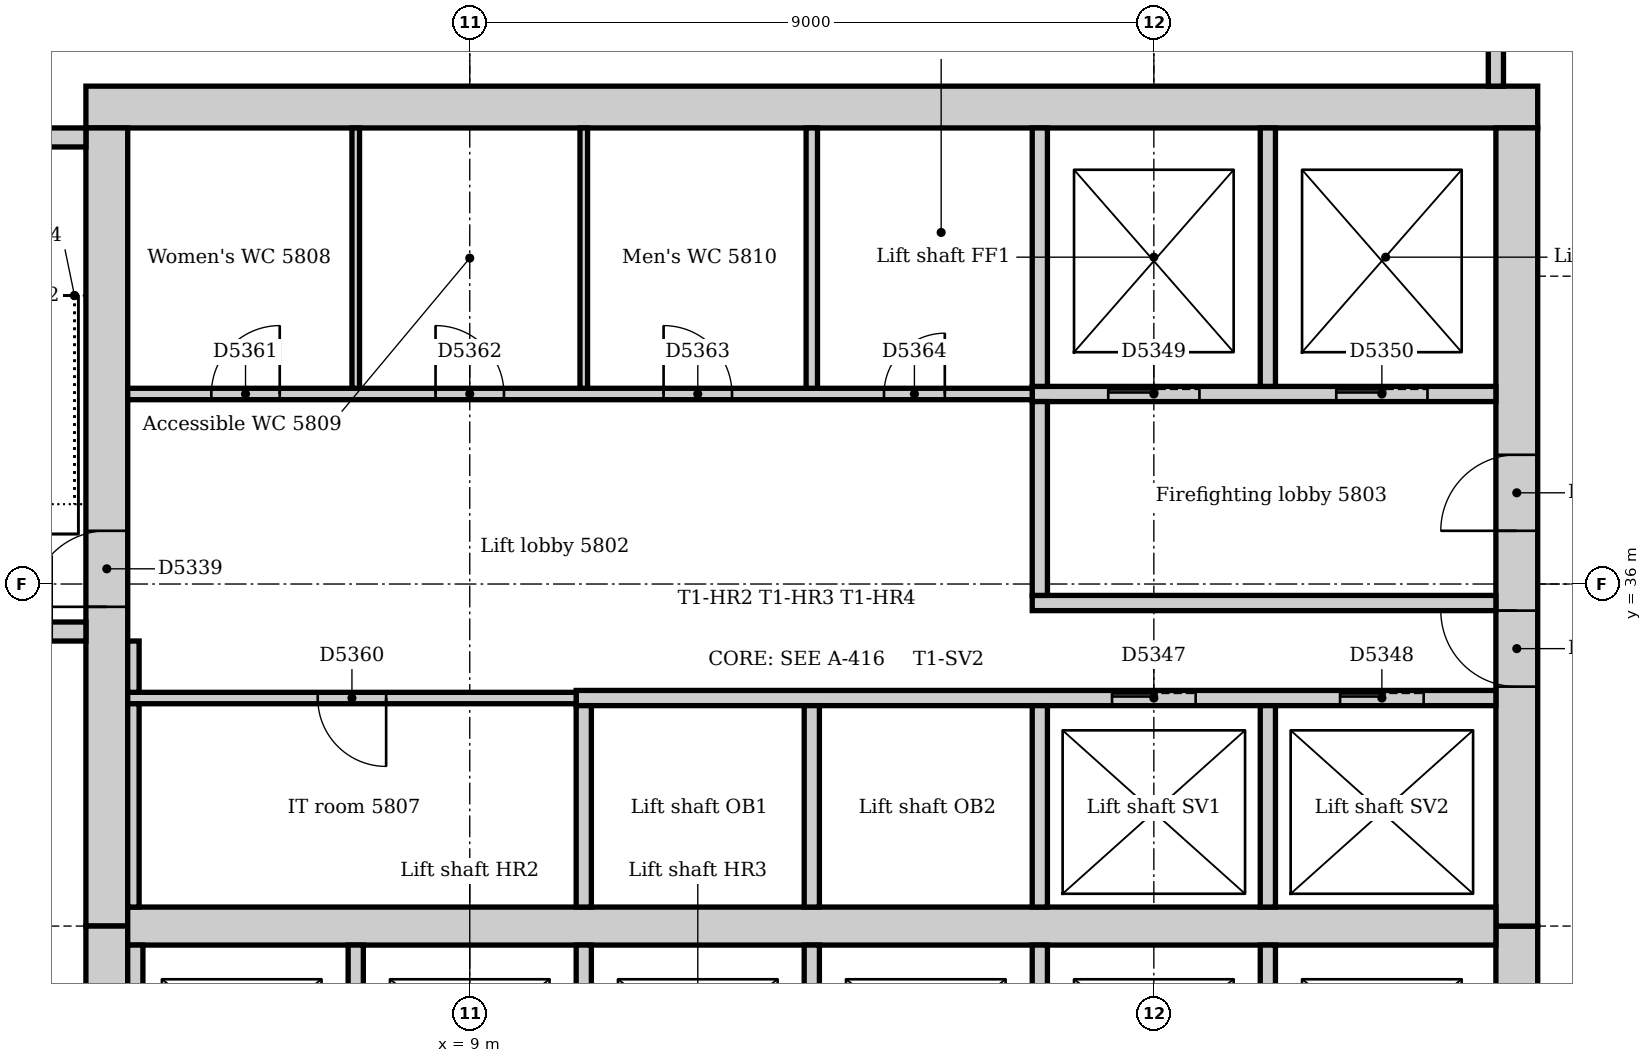
"""IFC4 building model, lengths in metres.
Left out: names, types, materials, properties, quantities, classifications, styles, units other than length and angle.
Written with IfcOpenShell. Run it as: python <this file> out.ifc"""

import sys

from ifc_helpers import new_model, si_unit, direction, frame, frame_2d, origin, place, context, subcontext, project, spatial, rectangle, extrude, element, fill, save


model = new_model("IFC4")
c1 = context("Model", 3, precision=1e-05, world=origin(), true_north=direction((0.0, 1.0)))
c2 = subcontext(c1, "Body", "Model", "MODEL_VIEW")
j1 = project(units=[si_unit("LENGTHUNIT", "METRE"), si_unit("PLANEANGLEUNIT", "RADIAN")], contexts=[c1])
p1 = place(None, origin())
s1 = spatial("IfcSite", under=j1, at=p1, CompositionType="ELEMENT")
p2 = place(p1, origin())
s2 = spatial("IfcBuilding", under=s1, at=p2, CompositionType="ELEMENT")
p3 = place(p2, frame((0.0, 0.0, 242.0)))
s3 = spatial("IfcBuildingStorey", under=s2, at=p3, CompositionType="ELEMENT", Elevation=242.0)
p4 = place(p3, frame((23.05, 42.275, 0.0), z_axis=(0.0, 0.0, 1.0), x_axis=(-1.0, 0.0, 0.0)))
e1 = element("IfcWall", 1, at=p4, inside=s3, PredefinedType="SOLIDWALL", context=c2, shape_type="SweptSolid", body=[
    extrude(rectangle(XDim=19.1, YDim=0.55, at=frame_2d((9.55, 0.0))), origin(), (0.0, 0.0, 1.0), 5.0),
])
p5 = place(p3, frame((22.775, 21.0, 0.0), z_axis=(0.0, 0.0, 1.0), x_axis=(0.0, 1.0, 0.0)))
e2 = element("IfcWall", 2, at=p5, inside=s3, PredefinedType="SOLIDWALL", context=c2, shape_type="SweptSolid", body=[
    extrude(rectangle(XDim=10.5, YDim=0.55, at=frame_2d((5.25, 0.0))), origin(), (0.0, 0.0, 1.0), 5.0),
])
p6 = place(p5, frame((4.35, 0.0, 0.0)))
e3 = element("IfcOpeningElement", 3, at=p6, cuts=e2, PredefinedType="OPENING", context=c2, shape_type="SweptSolid", body=[
    extrude(rectangle(XDim=1.8, YDim=2.1, at=frame_2d((0.9, 1.05))), frame((0.0, 0.285, 0.0), z_axis=(0.0, -1.0, 0.0), x_axis=(1.0, 0.0, 0.0)), (0.0, 0.0, 1.0), 0.57),
])
p7 = place(p3, frame((22.775, 31.5, 0.0), z_axis=(0.0, 0.0, 1.0), x_axis=(0.0, 1.0, 0.0)))
e4 = element("IfcWall", 4, at=p7, inside=s3, PredefinedType="SOLIDWALL", context=c2, shape_type="SweptSolid", body=[
    extrude(rectangle(XDim=10.5, YDim=0.55, at=frame_2d((5.25, 0.0))), origin(), (0.0, 0.0, 1.0), 5.0),
])
p8 = place(p7, frame((3.15, 0.0, 0.0)))
e5 = element("IfcOpeningElement", 5, at=p8, cuts=e4, PredefinedType="OPENING", context=c2, shape_type="SweptSolid", body=[
    extrude(rectangle(XDim=1.0, YDim=2.1, at=frame_2d((0.5, 1.05))), frame((0.0, 0.285, 0.0), z_axis=(0.0, -1.0, 0.0), x_axis=(1.0, 0.0, 0.0)), (0.0, 0.0, 1.0), 0.57),
])
p9 = place(p7, frame((5.2, 0.0, 0.0)))
e6 = element("IfcOpeningElement", 6, at=p9, cuts=e4, PredefinedType="OPENING", context=c2, shape_type="SweptSolid", body=[
    extrude(rectangle(XDim=1.0, YDim=2.1, at=frame_2d((0.5, 1.05))), frame((0.0, 0.285, 0.0), z_axis=(0.0, -1.0, 0.0), x_axis=(1.0, 0.0, 0.0)), (0.0, 0.0, 1.0), 0.57),
])
p10 = place(p3, frame((4.225, 42.0, 0.0), z_axis=(0.0, 0.0, 1.0), x_axis=(0.0, -1.0, 0.0)))
e7 = element("IfcWall", 7, at=p10, inside=s3, PredefinedType="SOLIDWALL", context=c2, shape_type="SweptSolid", body=[
    extrude(rectangle(XDim=10.5, YDim=0.55, at=frame_2d((5.25, 0.0))), origin(), (0.0, 0.0, 1.0), 5.0),
])
p11 = place(p10, frame((5.3, 0.0, 0.0)))
e8 = element("IfcOpeningElement", 8, at=p11, cuts=e7, PredefinedType="OPENING", context=c2, shape_type="SweptSolid", body=[
    extrude(rectangle(XDim=1.0, YDim=2.1, at=frame_2d((0.5, 1.05))), frame((0.0, 0.285, 0.0), z_axis=(0.0, -1.0, 0.0), x_axis=(1.0, 0.0, 0.0)), (0.0, 0.0, 1.0), 0.57),
])
p12 = place(p3, frame((4.225, 31.5, 0.0), z_axis=(0.0, 0.0, 1.0), x_axis=(0.0, -1.0, 0.0)))
e9 = element("IfcWall", 9, at=p12, inside=s3, PredefinedType="SOLIDWALL", context=c2, shape_type="SweptSolid", body=[
    extrude(rectangle(XDim=10.5, YDim=0.55, at=frame_2d((5.25, 0.0))), origin(), (0.0, 0.0, 1.0), 5.0),
])
p13 = place(p12, frame((4.25, 0.0, 0.0)))
e10 = element("IfcOpeningElement", 10, at=p13, cuts=e9, PredefinedType="OPENING", context=c2, shape_type="SweptSolid", body=[
    extrude(rectangle(XDim=1.0, YDim=2.1, at=frame_2d((0.5, 1.05))), frame((0.0, 0.285, 0.0), z_axis=(0.0, -1.0, 0.0), x_axis=(1.0, 0.0, 0.0)), (0.0, 0.0, 1.0), 0.57),
])
p14 = place(p3, frame((4.5, 31.5, 0.0), z_axis=(0.0, 0.0, 1.0), x_axis=(1.0, 0.0, 0.0)))
e11 = element("IfcWall", 11, at=p14, inside=s3, PredefinedType="SOLIDWALL", context=c2, shape_type="SweptSolid", body=[
    extrude(rectangle(XDim=18.0, YDim=0.5, at=frame_2d((9.0, 0.0))), origin(), (0.0, 0.0, 1.0), 5.0),
])
p15 = place(p3, frame((0.36, 35.375, 0.0), z_axis=(0.0, 0.0, 1.0), x_axis=(1.0, 0.0, 0.0)))
e12 = element("IfcWall", 12, at=p15, inside=s3, PredefinedType="SOLIDWALL", context=c2, shape_type="SweptSolid", body=[
    extrude(rectangle(XDim=3.59, YDim=0.25, at=frame_2d((1.795, 0.0))), origin(), (0.0, 0.0, 1.0), 5.0),
])
p16 = place(p15, frame((2.14, 0.0, 0.0)))
e13 = element("IfcOpeningElement", 13, at=p16, cuts=e12, PredefinedType="OPENING", context=c2, shape_type="SweptSolid", body=[
    extrude(rectangle(XDim=1.0, YDim=2.1, at=frame_2d((0.5, 1.05))), frame((0.0, 0.135, 0.0), z_axis=(0.0, -1.0, 0.0), x_axis=(1.0, 0.0, 0.0)), (0.0, 0.0, 1.0), 0.27),
])
p17 = place(p3, frame((3.95, 41.875, 0.0), z_axis=(0.0, 0.0, 1.0), x_axis=(-1.0, 0.0, 0.0)))
e14 = element("IfcWall", 14, at=p17, inside=s3, PredefinedType="SOLIDWALL", context=c2, shape_type="SweptSolid", body=[
    extrude(rectangle(XDim=3.59, YDim=0.25, at=frame_2d((1.795, 0.0))), origin(), (0.0, 0.0, 1.0), 5.0),
])
p18 = place(p3, frame((16.4, 35.75, 0.0), z_axis=(0.0, 0.0, 1.0), x_axis=(1.0, 0.0, 0.0)))
e15 = element("IfcWall", 15, at=p18, inside=s3, PredefinedType="PARTITIONING", context=c2, shape_type="SweptSolid", body=[
    extrude(rectangle(XDim=6.1, YDim=0.2, at=frame_2d((3.05, 0.0))), origin(), (0.0, 0.0, 1.0), 4.85),
])
p19 = place(p3, frame((16.4, 38.5, 0.0), z_axis=(0.0, 0.0, 1.0), x_axis=(1.0, 0.0, 0.0)))
e16 = element("IfcWall", 16, at=p19, inside=s3, PredefinedType="PARTITIONING", context=c2, shape_type="SweptSolid", body=[
    extrude(rectangle(XDim=6.1, YDim=0.2, at=frame_2d((3.05, 0.0))), origin(), (0.0, 0.0, 1.0), 4.85),
])
p20 = place(p19, frame((1.0, 0.0, 0.0)))
e17 = element("IfcOpeningElement", 17, at=p20, cuts=e16, PredefinedType="OPENING", context=c2, shape_type="SweptSolid", body=[
    extrude(rectangle(XDim=1.2, YDim=2.1, at=frame_2d((0.6, 1.05))), frame((0.0, 0.11, 0.0), z_axis=(0.0, -1.0, 0.0), x_axis=(1.0, 0.0, 0.0)), (0.0, 0.0, 1.0), 0.22),
])
p21 = place(p19, frame((4.0, 0.0, 0.0)))
e18 = element("IfcOpeningElement", 18, at=p21, cuts=e16, PredefinedType="OPENING", context=c2, shape_type="SweptSolid", body=[
    extrude(rectangle(XDim=1.2, YDim=2.1, at=frame_2d((0.6, 1.05))), frame((0.0, 0.11, 0.0), z_axis=(0.0, -1.0, 0.0), x_axis=(1.0, 0.0, 0.0)), (0.0, 0.0, 1.0), 0.22),
])
p22 = place(p3, frame((22.5, 42.55, 0.0), z_axis=(0.0, 0.0, 1.0), x_axis=(0.0, 1.0, 0.0)))
e19 = element("IfcWall", 19, at=p22, inside=s3, PredefinedType="PARTITIONING", context=c2, shape_type="SweptSolid", body=[
    extrude(rectangle(XDim=2.35, YDim=0.2, at=frame_2d((1.175, 0.0))), origin(), (0.0, 0.0, 1.0), 4.85),
])
p23 = place(p22, frame((0.65, 0.0, 0.0)))
e20 = element("IfcOpeningElement", 20, at=p23, cuts=e19, PredefinedType="OPENING", context=c2, shape_type="SweptSolid", body=[
    extrude(rectangle(XDim=1.0, YDim=2.1, at=frame_2d((0.5, 1.05))), frame((0.0, 0.11, 0.0), z_axis=(0.0, -1.0, 0.0), x_axis=(1.0, 0.0, 0.0)), (0.0, 0.0, 1.0), 0.22),
])
p24 = place(p3, frame((16.5, 35.85, 0.0), z_axis=(0.0, 0.0, 1.0), x_axis=(0.0, 1.0, 0.0)))
e21 = element("IfcWall", 21, at=p24, inside=s3, PredefinedType="PARTITIONING", context=c2, shape_type="SweptSolid", body=[
    extrude(rectangle(XDim=2.55, YDim=0.2, at=frame_2d((1.275, 0.0))), origin(), (0.0, 0.0, 1.0), 4.85),
])
p25 = place(p3, frame((10.4, 34.5, 0.0), z_axis=(0.0, 0.0, 1.0), x_axis=(1.0, 0.0, 0.0)))
e22 = element("IfcWall", 22, at=p25, inside=s3, PredefinedType="PARTITIONING", context=c2, shape_type="SweptSolid", body=[
    extrude(rectangle(XDim=12.1, YDim=0.2, at=frame_2d((6.05, 0.0))), origin(), (0.0, 0.0, 1.0), 4.85),
])
p26 = place(p25, frame((7.05, 0.0, 0.0)))
e23 = element("IfcOpeningElement", 23, at=p26, cuts=e22, PredefinedType="OPENING", context=c2, shape_type="SweptSolid", body=[
    extrude(rectangle(XDim=1.1, YDim=2.1, at=frame_2d((0.55, 1.05))), frame((0.0, 0.11, 0.0), z_axis=(0.0, -1.0, 0.0), x_axis=(1.0, 0.0, 0.0)), (0.0, 0.0, 1.0), 0.22),
])
p27 = place(p25, frame((10.05, 0.0, 0.0)))
e24 = element("IfcOpeningElement", 24, at=p27, cuts=e22, PredefinedType="OPENING", context=c2, shape_type="SweptSolid", body=[
    extrude(rectangle(XDim=1.1, YDim=2.1, at=frame_2d((0.55, 1.05))), frame((0.0, 0.11, 0.0), z_axis=(0.0, -1.0, 0.0), x_axis=(1.0, 0.0, 0.0)), (0.0, 0.0, 1.0), 0.22),
])
for number, where, z_axis, x_axis in (
    (25, (10.5, 28.6, 0.0), (0.0, 0.0, 1.0), (0.0, 1.0, 0.0)),
    (26, (10.5, 31.75, 0.0), (0.0, 0.0, 1.0), (0.0, 1.0, 0.0)),
    (27, (13.5, 28.6, 0.0), (0.0, 0.0, 1.0), (0.0, 1.0, 0.0)),
    (28, (13.5, 31.75, 0.0), (0.0, 0.0, 1.0), (0.0, 1.0, 0.0)),
    (29, (16.5, 28.6, 0.0), (0.0, 0.0, 1.0), (0.0, 1.0, 0.0)),
    (30, (16.5, 31.75, 0.0), (0.0, 0.0, 1.0), (0.0, 1.0, 0.0)),
    (31, (19.5, 28.6, 0.0), (0.0, 0.0, 1.0), (0.0, 1.0, 0.0)),
    (32, (19.5, 31.75, 0.0), (0.0, 0.0, 1.0), (0.0, 1.0, 0.0)),
):
    element("IfcWall", number, at=place(p3, frame(where, z_axis=z_axis, x_axis=x_axis)), inside=s3, PredefinedType="PARTITIONING", context=c2, shape_type="SweptSolid", body=[
        extrude(rectangle(XDim=2.65, YDim=0.2, at=frame_2d((1.325, 0.0))), origin(), (0.0, 0.0, 1.0), 4.85),
    ])
for number, where, z_axis, x_axis in (
    (33, (16.5, 38.6, 0.0), (0.0, 0.0, 1.0), (0.0, 1.0, 0.0)),
    (34, (19.5, 38.6, 0.0), (0.0, 0.0, 1.0), (0.0, 1.0, 0.0)),
):
    element("IfcWall", number, at=place(p3, frame(where, z_axis=z_axis, x_axis=x_axis)), inside=s3, PredefinedType="PARTITIONING", context=c2, shape_type="SweptSolid", body=[
        extrude(rectangle(XDim=3.4, YDim=0.2, at=frame_2d((1.7, 0.0))), origin(), (0.0, 0.0, 1.0), 4.85),
    ])
for number, where, z_axis, x_axis in (
    (35, (4.6, 28.6, 0.0), (0.0, 0.0, 1.0), (0.0, 1.0, 0.0)),
    (36, (7.5, 28.6, 0.0), (0.0, 0.0, 1.0), (0.0, 1.0, 0.0)),
):
    element("IfcWall", number, at=place(p3, frame(where, z_axis=z_axis, x_axis=x_axis)), inside=s3, PredefinedType="PARTITIONING", context=c2, shape_type="SweptSolid", body=[
        extrude(rectangle(XDim=2.65, YDim=0.2, at=frame_2d((1.325, 0.0))), origin(), (0.0, 0.0, 1.0), 4.85),
    ])
p28 = place(p3, frame((4.5, 38.5, 0.0), z_axis=(0.0, 0.0, 1.0), x_axis=(1.0, 0.0, 0.0)))
e37 = element("IfcWall", 37, at=p28, inside=s3, PredefinedType="PARTITIONING", context=c2, shape_type="SweptSolid", body=[
    extrude(rectangle(XDim=11.9, YDim=0.15, at=frame_2d((5.95, 0.0))), origin(), (0.0, 0.0, 1.0), 4.85),
])
p29 = place(p28, frame((1.1, 0.0, 0.0)))
e38 = element("IfcOpeningElement", 38, at=p29, cuts=e37, PredefinedType="OPENING", context=c2, shape_type="SweptSolid", body=[
    extrude(rectangle(XDim=0.9, YDim=2.1, at=frame_2d((0.45, 1.05))), frame((0.0, 0.085, 0.0), z_axis=(0.0, -1.0, 0.0), x_axis=(1.0, 0.0, 0.0)), (0.0, 0.0, 1.0), 0.17),
])
p30 = place(p28, frame((4.05, 0.0, 0.0)))
e39 = element("IfcOpeningElement", 39, at=p30, cuts=e37, PredefinedType="OPENING", context=c2, shape_type="SweptSolid", body=[
    extrude(rectangle(XDim=0.9, YDim=2.1, at=frame_2d((0.45, 1.05))), frame((0.0, 0.085, 0.0), z_axis=(0.0, -1.0, 0.0), x_axis=(1.0, 0.0, 0.0)), (0.0, 0.0, 1.0), 0.17),
])
p31 = place(p28, frame((7.05, 0.0, 0.0)))
e40 = element("IfcOpeningElement", 40, at=p31, cuts=e37, PredefinedType="OPENING", context=c2, shape_type="SweptSolid", body=[
    extrude(rectangle(XDim=0.9, YDim=2.1, at=frame_2d((0.45, 1.05))), frame((0.0, 0.085, 0.0), z_axis=(0.0, -1.0, 0.0), x_axis=(1.0, 0.0, 0.0)), (0.0, 0.0, 1.0), 0.17),
])
p32 = place(p28, frame((9.95, 0.0, 0.0)))
e41 = element("IfcOpeningElement", 41, at=p32, cuts=e37, PredefinedType="OPENING", context=c2, shape_type="SweptSolid", body=[
    extrude(rectangle(XDim=0.8, YDim=2.1, at=frame_2d((0.4, 1.05))), frame((0.0, 0.085, 0.0), z_axis=(0.0, -1.0, 0.0), x_axis=(1.0, 0.0, 0.0)), (0.0, 0.0, 1.0), 0.17),
])
p33 = place(p3, frame((4.5, 34.5, 0.0), z_axis=(0.0, 0.0, 1.0), x_axis=(1.0, 0.0, 0.0)))
e42 = element("IfcWall", 42, at=p33, inside=s3, PredefinedType="PARTITIONING", context=c2, shape_type="SweptSolid", body=[
    extrude(rectangle(XDim=5.9, YDim=0.15, at=frame_2d((2.95, 0.0))), origin(), (0.0, 0.0, 1.0), 4.85),
])
p34 = place(p33, frame((2.5, 0.0, 0.0)))
e43 = element("IfcOpeningElement", 43, at=p34, cuts=e42, PredefinedType="OPENING", context=c2, shape_type="SweptSolid", body=[
    extrude(rectangle(XDim=0.9, YDim=2.1, at=frame_2d((0.45, 1.05))), frame((0.0, 0.085, 0.0), z_axis=(0.0, -1.0, 0.0), x_axis=(1.0, 0.0, 0.0)), (0.0, 0.0, 1.0), 0.17),
])
p35 = place(p3, frame((4.575, 34.575, 0.0), z_axis=(0.0, 0.0, 1.0), x_axis=(0.0, 1.0, 0.0)))
e44 = element("IfcWall", 44, at=p35, inside=s3, PredefinedType="PARTITIONING", context=c2, shape_type="SweptSolid", body=[
    extrude(rectangle(XDim=0.675, YDim=0.15, at=frame_2d((0.338, 0.0))), origin(), (0.0, 0.0, 1.0), 4.85),
])
p36 = place(p3, frame((4.575, 31.75, 0.0), z_axis=(0.0, 0.0, 1.0), x_axis=(0.0, 1.0, 0.0)))
e45 = element("IfcWall", 45, at=p36, inside=s3, PredefinedType="PARTITIONING", context=c2, shape_type="SweptSolid", body=[
    extrude(rectangle(XDim=2.675, YDim=0.15, at=frame_2d((1.337, 0.0))), origin(), (0.0, 0.0, 1.0), 4.85),
])
p37 = place(p3, frame((13.5, 38.575, 0.0), z_axis=(0.0, 0.0, 1.0), x_axis=(0.0, 1.0, 0.0)))
e46 = element("IfcWall", 46, at=p37, inside=s3, PredefinedType="PARTITIONING", context=c2, shape_type="SweptSolid", body=[
    extrude(rectangle(XDim=3.425, YDim=0.15, at=frame_2d((1.712, 0.0))), origin(), (0.0, 0.0, 1.0), 4.85),
])
for number, where, z_axis, x_axis in (
    (47, (7.5, 38.575, 0.0), (0.0, 0.0, 1.0), (0.0, 1.0, 0.0)),
    (48, (10.5, 38.575, 0.0), (0.0, 0.0, 1.0), (0.0, 1.0, 0.0)),
):
    element("IfcWall", number, at=place(p3, frame(where, z_axis=z_axis, x_axis=x_axis)), inside=s3, PredefinedType="PARTITIONING", context=c2, shape_type="SweptSolid", body=[
        extrude(rectangle(XDim=3.425, YDim=0.1, at=frame_2d((1.712, 0.0))), origin(), (0.0, 0.0, 1.0), 4.85),
    ])
p38 = place(p11, frame((1.0, 0.0, 0.0), z_axis=(0.0, 0.0, 1.0), x_axis=(-1.0, 0.0, 0.0)))
e49 = element("IfcDoor", 49, at=p38, inside=s3, OperationType="SINGLE_SWING_LEFT", PredefinedType="DOOR", context=c2, shape_type="SweptSolid", body=[
    extrude(rectangle(XDim=1.0, YDim=2.1, at=frame_2d((0.5, 1.05))), frame((0.0, 0.025, 0.0), z_axis=(0.0, -1.0, 0.0), x_axis=(1.0, 0.0, 0.0)), (0.0, 0.0, 1.0), 0.05),
])
fill(e8, e49)
p39 = place(p26, origin())
e50 = element("IfcDoor", 50, at=p39, inside=s3, OperationType="SLIDING_TO_LEFT", PredefinedType="DOOR", context=c2, shape_type="SweptSolid", body=[
    extrude(rectangle(XDim=1.1, YDim=2.1, at=frame_2d((0.55, 1.05))), frame((0.0, 0.025, 0.0), z_axis=(0.0, -1.0, 0.0), x_axis=(1.0, 0.0, 0.0)), (0.0, 0.0, 1.0), 0.05),
])
fill(e23, e50)
p40 = place(p27, origin())
e51 = element("IfcDoor", 51, at=p40, inside=s3, OperationType="SLIDING_TO_LEFT", PredefinedType="DOOR", context=c2, shape_type="SweptSolid", body=[
    extrude(rectangle(XDim=1.1, YDim=2.1, at=frame_2d((0.55, 1.05))), frame((0.0, 0.025, 0.0), z_axis=(0.0, -1.0, 0.0), x_axis=(1.0, 0.0, 0.0)), (0.0, 0.0, 1.0), 0.05),
])
fill(e24, e51)
p41 = place(p20, origin())
e52 = element("IfcDoor", 52, at=p41, inside=s3, OperationType="SLIDING_TO_LEFT", PredefinedType="DOOR", context=c2, shape_type="SweptSolid", body=[
    extrude(rectangle(XDim=1.2, YDim=2.1, at=frame_2d((0.6, 1.05))), frame((0.0, 0.025, 0.0), z_axis=(0.0, -1.0, 0.0), x_axis=(1.0, 0.0, 0.0)), (0.0, 0.0, 1.0), 0.05),
])
fill(e17, e52)
p42 = place(p21, origin())
e53 = element("IfcDoor", 53, at=p42, inside=s3, OperationType="SLIDING_TO_LEFT", PredefinedType="DOOR", context=c2, shape_type="SweptSolid", body=[
    extrude(rectangle(XDim=1.2, YDim=2.1, at=frame_2d((0.6, 1.05))), frame((0.0, 0.025, 0.0), z_axis=(0.0, -1.0, 0.0), x_axis=(1.0, 0.0, 0.0)), (0.0, 0.0, 1.0), 0.05),
])
fill(e18, e53)
p43 = place(p8, origin())
e54 = element("IfcDoor", 54, at=p43, inside=s3, OperationType="SINGLE_SWING_RIGHT", PredefinedType="DOOR", context=c2, shape_type="SweptSolid", body=[
    extrude(rectangle(XDim=1.0, YDim=2.1, at=frame_2d((0.5, 1.05))), frame((0.0, 0.025, 0.0), z_axis=(0.0, -1.0, 0.0), x_axis=(1.0, 0.0, 0.0)), (0.0, 0.0, 1.0), 0.05),
])
fill(e5, e54)
p44 = place(p9, origin())
e55 = element("IfcDoor", 55, at=p44, inside=s3, OperationType="SINGLE_SWING_LEFT", PredefinedType="DOOR", context=c2, shape_type="SweptSolid", body=[
    extrude(rectangle(XDim=1.0, YDim=2.1, at=frame_2d((0.5, 1.05))), frame((0.0, 0.025, 0.0), z_axis=(0.0, -1.0, 0.0), x_axis=(1.0, 0.0, 0.0)), (0.0, 0.0, 1.0), 0.05),
])
fill(e6, e55)
p45 = place(p34, frame((0.9, 0.0, 0.0), z_axis=(0.0, 0.0, 1.0), x_axis=(-1.0, 0.0, 0.0)))
e56 = element("IfcDoor", 56, at=p45, inside=s3, OperationType="SINGLE_SWING_LEFT", PredefinedType="DOOR", context=c2, shape_type="SweptSolid", body=[
    extrude(rectangle(XDim=0.9, YDim=2.1, at=frame_2d((0.45, 1.05))), frame((0.0, 0.025, 0.0), z_axis=(0.0, -1.0, 0.0), x_axis=(1.0, 0.0, 0.0)), (0.0, 0.0, 1.0), 0.05),
])
fill(e43, e56)
p46 = place(p29, origin())
e57 = element("IfcDoor", 57, at=p46, inside=s3, OperationType="SINGLE_SWING_RIGHT", PredefinedType="DOOR", context=c2, shape_type="SweptSolid", body=[
    extrude(rectangle(XDim=0.9, YDim=2.1, at=frame_2d((0.45, 1.05))), frame((0.0, 0.025, 0.0), z_axis=(0.0, -1.0, 0.0), x_axis=(1.0, 0.0, 0.0)), (0.0, 0.0, 1.0), 0.05),
])
fill(e38, e57)
p47 = place(p30, origin())
e58 = element("IfcDoor", 58, at=p47, inside=s3, OperationType="SINGLE_SWING_LEFT", PredefinedType="DOOR", context=c2, shape_type="SweptSolid", body=[
    extrude(rectangle(XDim=0.9, YDim=2.1, at=frame_2d((0.45, 1.05))), frame((0.0, 0.025, 0.0), z_axis=(0.0, -1.0, 0.0), x_axis=(1.0, 0.0, 0.0)), (0.0, 0.0, 1.0), 0.05),
])
fill(e39, e58)
p48 = place(p31, origin())
e59 = element("IfcDoor", 59, at=p48, inside=s3, OperationType="SINGLE_SWING_LEFT", PredefinedType="DOOR", context=c2, shape_type="SweptSolid", body=[
    extrude(rectangle(XDim=0.9, YDim=2.1, at=frame_2d((0.45, 1.05))), frame((0.0, 0.025, 0.0), z_axis=(0.0, -1.0, 0.0), x_axis=(1.0, 0.0, 0.0)), (0.0, 0.0, 1.0), 0.05),
])
fill(e40, e59)
p49 = place(p32, origin())
e60 = element("IfcDoor", 60, at=p49, inside=s3, OperationType="SINGLE_SWING_RIGHT", PredefinedType="DOOR", context=c2, shape_type="SweptSolid", body=[
    extrude(rectangle(XDim=0.8, YDim=2.1, at=frame_2d((0.4, 1.05))), frame((0.0, 0.025, 0.0), z_axis=(0.0, -1.0, 0.0), x_axis=(1.0, 0.0, 0.0)), (0.0, 0.0, 1.0), 0.05),
])
fill(e41, e60)
save(model, sys.argv[1])
